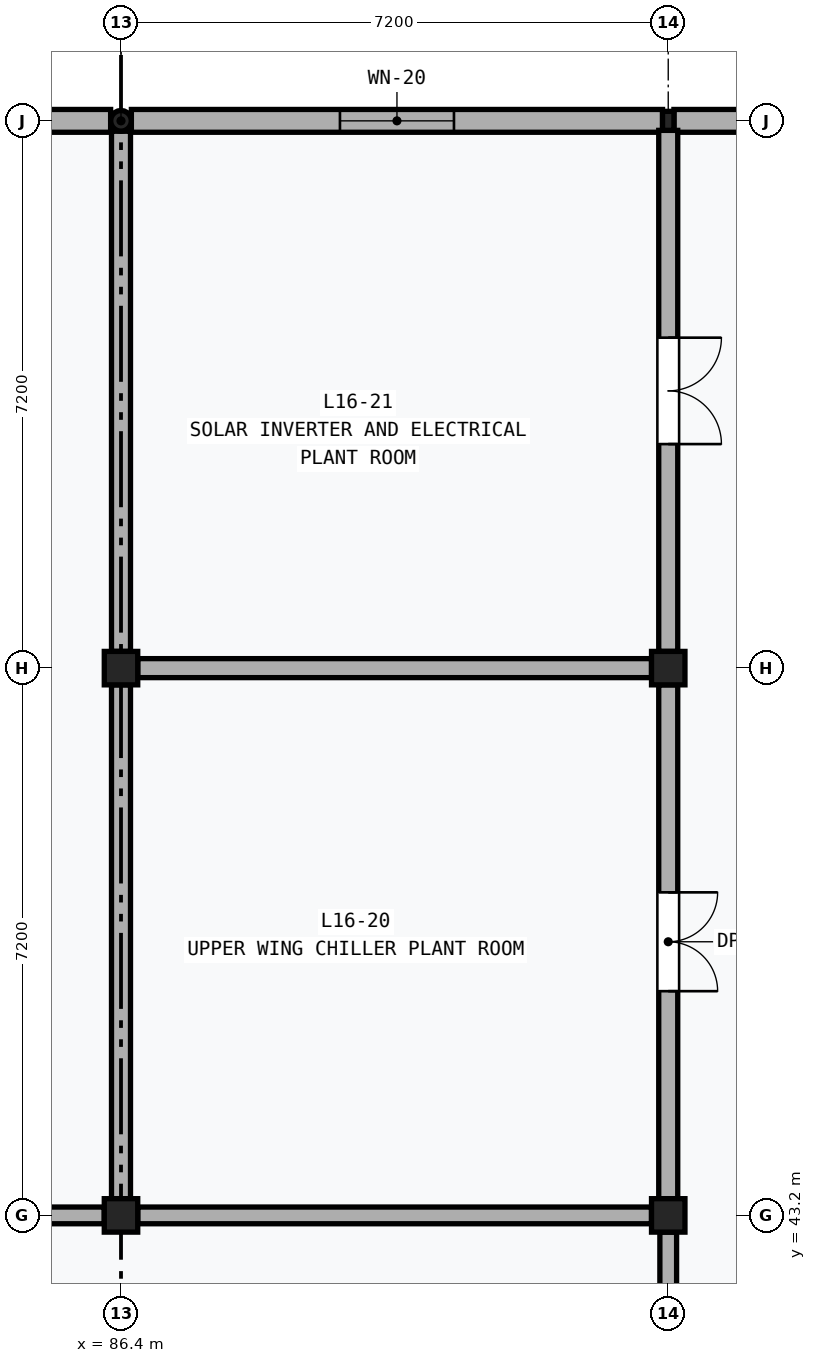
"""IFC4 building model, lengths in metres.
Left out: names, types, materials, properties, quantities, classifications, styles, units other than length and angle.
Written with IfcOpenShell. Run it as: python <this file> out.ifc"""

import sys

from ifc_helpers import new_model, si_unit, direction, frame, frame_2d, origin, origin_2d, place, context, subcontext, project, spatial, rectangle, hollow_rectangle, hollow_circle, extrude, element, fill, save


model = new_model("IFC4")
c1 = context("Model", 3, precision=1e-05, world=origin(), true_north=direction((0.0, 1.0)))
c2 = subcontext(c1, "Body", "Model", "MODEL_VIEW")
j1 = project(units=[si_unit("LENGTHUNIT", "METRE"), si_unit("PLANEANGLEUNIT", "RADIAN")], contexts=[c1])
p1 = place(None, origin())
s1 = spatial("IfcSite", under=j1, at=p1, CompositionType="ELEMENT")
p2 = place(p1, origin())
s2 = spatial("IfcBuilding", under=s1, at=p2, CompositionType="ELEMENT")
p3 = place(p2, frame((0.0, 0.0, 67.2)))
s3 = spatial("IfcBuildingStorey", under=s2, at=p3, CompositionType="ELEMENT", Elevation=67.2)
for number, where, z_axis, x_axis in (
    (1, (86.4, 43.2, 0.0), (0.0, 0.0, 1.0), (1.0, 0.0, 0.0)),
    (2, (86.4, 50.4, 0.0), (0.0, 0.0, 1.0), (1.0, 0.0, 0.0)),
):
    element("IfcColumn", number, at=place(p3, frame(where, z_axis=z_axis, x_axis=x_axis)), inside=s3, PredefinedType="COLUMN", context=c2, shape_type="SweptSolid", body=[
        extrude(rectangle(XDim=0.44, YDim=0.44, at=origin_2d()), origin(), (0.0, 0.0, 1.0), 4.8),
    ])
p4 = place(p3, frame((86.4, 57.6, 0.0), z_axis=(0.0, 0.0, 1.0), x_axis=(1.0, 0.0, 0.0)))
e3 = element("IfcColumn", 3, at=p4, inside=s3, PredefinedType="COLUMN", context=c2, shape_type="SweptSolid", body=[
    extrude(hollow_circle(Radius=0.136, WallThickness=0.012, at=origin_2d()), origin(), (0.0, 0.0, 1.0), 4.8),
])
for number, where, z_axis, x_axis in (
    (4, (93.6, 43.2, 0.0), (0.0, 0.0, 1.0), (1.0, 0.0, 0.0)),
    (5, (93.6, 50.4, 0.0), (0.0, 0.0, 1.0), (1.0, 0.0, 0.0)),
):
    element("IfcColumn", number, at=place(p3, frame(where, z_axis=z_axis, x_axis=x_axis)), inside=s3, PredefinedType="COLUMN", context=c2, shape_type="SweptSolid", body=[
        extrude(rectangle(XDim=0.44, YDim=0.44, at=origin_2d()), origin(), (0.0, 0.0, 1.0), 4.8),
    ])
p5 = place(p3, frame((93.6, 57.6, 0.0), z_axis=(0.0, 0.0, 1.0), x_axis=(1.0, 0.0, 0.0)))
e6 = element("IfcColumn", 6, at=p5, inside=s3, PredefinedType="COLUMN", context=c2, shape_type="SweptSolid", body=[
    extrude(hollow_rectangle(XDim=0.15, YDim=0.25, WallThickness=0.01, at=origin_2d()), origin(), (0.0, 0.0, 1.0), 4.8),
])
p6 = place(p3, frame((79.275, 57.6, 0.0), z_axis=(0.0, 0.0, 1.0), x_axis=(1.0, 0.0, 0.0)))
e7 = element("IfcWall", 7, at=p6, inside=s3, PredefinedType="SOLIDWALL", context=c2, shape_type="SweptSolid", body=[
    extrude(rectangle(XDim=6.989, YDim=0.3, at=frame_2d((3.494, 0.0))), origin(), (0.0, 0.0, 1.0), 4.16),
])
p7 = place(p6, frame((2.244, 0.0, 1.1)))
e8 = element("IfcOpeningElement", 8, at=p7, cuts=e7, PredefinedType="OPENING", context=c2, shape_type="SweptSolid", body=[
    extrude(rectangle(XDim=2.5, YDim=1.5, at=frame_2d((1.25, 0.75))), frame((0.0, 0.162, 0.0), z_axis=(0.0, -1.0, 0.0), x_axis=(1.0, 0.0, 0.0)), (0.0, 0.0, 1.0), 0.324),
])
p8 = place(p3, frame((86.537, 57.6, 0.0), z_axis=(0.0, 0.0, 1.0), x_axis=(1.0, 0.0, 0.0)))
e9 = element("IfcWall", 9, at=p8, inside=s3, PredefinedType="SOLIDWALL", context=c2, shape_type="SweptSolid", body=[
    extrude(rectangle(XDim=6.988, YDim=0.3, at=frame_2d((3.494, 0.0))), origin(), (0.0, 0.0, 1.0), 4.16),
])
p9 = place(p8, frame((2.744, 0.0, 1.2)))
e10 = element("IfcOpeningElement", 10, at=p9, cuts=e9, PredefinedType="OPENING", context=c2, shape_type="SweptSolid", body=[
    extrude(rectangle(XDim=1.5, YDim=1.35, at=frame_2d((0.75, 0.675))), frame((0.0, 0.162, 0.0), z_axis=(0.0, -1.0, 0.0), x_axis=(1.0, 0.0, 0.0)), (0.0, 0.0, 1.0), 0.324),
])
p10 = place(p3, frame((93.675, 57.6, 0.0), z_axis=(0.0, 0.0, 1.0), x_axis=(1.0, 0.0, 0.0)))
e11 = element("IfcWall", 11, at=p10, inside=s3, PredefinedType="SOLIDWALL", context=c2, shape_type="SweptSolid", body=[
    extrude(rectangle(XDim=6.989, YDim=0.3, at=frame_2d((3.494, 0.0))), origin(), (0.0, 0.0, 1.0), 4.16),
])
p11 = place(p10, frame((2.619, 0.0, 1.2)))
e12 = element("IfcOpeningElement", 12, at=p11, cuts=e11, PredefinedType="OPENING", context=c2, shape_type="SweptSolid", body=[
    extrude(rectangle(XDim=1.75, YDim=1.35, at=frame_2d((0.875, 0.675))), frame((0.0, 0.162, 0.0), z_axis=(0.0, -1.0, 0.0), x_axis=(1.0, 0.0, 0.0)), (0.0, 0.0, 1.0), 0.324),
])
p12 = place(p3, frame((79.42, 43.2, 0.0), z_axis=(0.0, 0.0, 1.0), x_axis=(1.0, 0.0, 0.0)))
e13 = element("IfcWall", 13, at=p12, inside=s3, PredefinedType="PARTITIONING", context=c2, shape_type="SweptSolid", body=[
    extrude(rectangle(XDim=6.76, YDim=0.22, at=frame_2d((3.38, 0.0))), origin(), (0.0, 0.0, 1.0), 4.2),
])
p13 = place(p3, frame((86.62, 43.2, 0.0), z_axis=(0.0, 0.0, 1.0), x_axis=(1.0, 0.0, 0.0)))
e14 = element("IfcWall", 14, at=p13, inside=s3, PredefinedType="PARTITIONING", context=c2, shape_type="SweptSolid", body=[
    extrude(rectangle(XDim=6.76, YDim=0.22, at=frame_2d((3.38, 0.0))), origin(), (0.0, 0.0, 1.0), 4.2),
])
p14 = place(p3, frame((93.6, 36.22, 0.0), z_axis=(0.0, 0.0, 1.0), x_axis=(0.0, 1.0, 0.0)))
e15 = element("IfcWall", 15, at=p14, inside=s3, PredefinedType="PARTITIONING", context=c2, shape_type="SweptSolid", body=[
    extrude(rectangle(XDim=6.76, YDim=0.22, at=frame_2d((3.38, 0.0))), origin(), (0.0, 0.0, 1.0), 4.26),
])
p15 = place(p3, frame((86.4, 43.42, 0.0), z_axis=(0.0, 0.0, 1.0), x_axis=(0.0, 1.0, 0.0)))
e16 = element("IfcWall", 16, at=p15, inside=s3, PredefinedType="PARTITIONING", context=c2, shape_type="SweptSolid", body=[
    extrude(rectangle(XDim=6.76, YDim=0.25, at=frame_2d((3.38, 0.0))), origin(), (0.0, 0.0, 1.0), 4.26),
])
p16 = place(p3, frame((86.4, 50.62, 0.0), z_axis=(0.0, 0.0, 1.0), x_axis=(0.0, 1.0, 0.0)))
e17 = element("IfcWall", 17, at=p16, inside=s3, PredefinedType="PARTITIONING", context=c2, shape_type="SweptSolid", body=[
    extrude(rectangle(XDim=6.843, YDim=0.25, at=frame_2d((3.422, 0.0))), origin(), (0.0, 0.0, 1.0), 4.26),
])
p17 = place(p3, frame((86.62, 50.4, 0.0), z_axis=(0.0, 0.0, 1.0), x_axis=(1.0, 0.0, 0.0)))
e18 = element("IfcWall", 18, at=p17, inside=s3, PredefinedType="PARTITIONING", context=c2, shape_type="SweptSolid", body=[
    extrude(rectangle(XDim=6.76, YDim=0.25, at=frame_2d((3.38, 0.0))), origin(), (0.0, 0.0, 1.0), 4.2),
])
p18 = place(p3, frame((93.6, 43.42, 0.0), z_axis=(0.0, 0.0, 1.0), x_axis=(0.0, 1.0, 0.0)))
e19 = element("IfcWall", 19, at=p18, inside=s3, PredefinedType="PARTITIONING", context=c2, shape_type="SweptSolid", body=[
    extrude(rectangle(XDim=6.76, YDim=0.25, at=frame_2d((3.38, 0.0))), origin(), (0.0, 0.0, 1.0), 4.26),
])
p19 = place(p18, frame((2.73, 0.0, 0.0)))
e20 = element("IfcOpeningElement", 20, at=p19, cuts=e19, PredefinedType="OPENING", context=c2, shape_type="SweptSolid", body=[
    extrude(rectangle(XDim=1.3, YDim=2.2, at=frame_2d((0.65, 1.1))), frame((0.0, 0.137, 0.0), z_axis=(0.0, -1.0, 0.0), x_axis=(1.0, 0.0, 0.0)), (0.0, 0.0, 1.0), 0.274),
])
p20 = place(p3, frame((93.6, 50.62, 0.0), z_axis=(0.0, 0.0, 1.0), x_axis=(0.0, 1.0, 0.0)))
e21 = element("IfcWall", 21, at=p20, inside=s3, PredefinedType="PARTITIONING", context=c2, shape_type="SweptSolid", body=[
    extrude(rectangle(XDim=6.855, YDim=0.25, at=frame_2d((3.427, 0.0))), origin(), (0.0, 0.0, 1.0), 4.26),
])
p21 = place(p20, frame((2.728, 0.0, 0.0)))
e22 = element("IfcOpeningElement", 22, at=p21, cuts=e21, PredefinedType="OPENING", context=c2, shape_type="SweptSolid", body=[
    extrude(rectangle(XDim=1.4, YDim=2.25, at=frame_2d((0.7, 1.125))), frame((0.0, 0.137, 0.0), z_axis=(0.0, -1.0, 0.0), x_axis=(1.0, 0.0, 0.0)), (0.0, 0.0, 1.0), 0.274),
])
p22 = place(p9, origin())
e23 = element("IfcWindow", 23, at=p22, inside=s3, PartitioningType="SINGLE_PANEL", PredefinedType="WINDOW", context=c2, shape_type="SweptSolid", body=[
    extrude(rectangle(XDim=1.5, YDim=1.35, at=frame_2d((0.75, 0.675))), frame((0.0, 0.03, 0.0), z_axis=(0.0, -1.0, 0.0), x_axis=(1.0, 0.0, 0.0)), (0.0, 0.0, 1.0), 0.06),
])
fill(e10, e23)
p23 = place(p19, frame((1.3, 0.0, 0.0), z_axis=(0.0, 0.0, 1.0), x_axis=(-1.0, 0.0, 0.0)))
e24 = element("IfcDoor", 24, at=p23, inside=s3, OperationType="DOUBLE_DOOR_SINGLE_SWING", PredefinedType="DOOR", context=c2, shape_type="SweptSolid", body=[
    extrude(rectangle(XDim=1.3, YDim=2.2, at=frame_2d((0.65, 1.1))), frame((0.0, 0.025, 0.0), z_axis=(0.0, -1.0, 0.0), x_axis=(1.0, 0.0, 0.0)), (0.0, 0.0, 1.0), 0.05),
])
fill(e20, e24)
p24 = place(p21, frame((1.4, 0.0, 0.0), z_axis=(0.0, 0.0, 1.0), x_axis=(-1.0, 0.0, 0.0)))
e25 = element("IfcDoor", 25, at=p24, inside=s3, OperationType="DOUBLE_DOOR_SINGLE_SWING", PredefinedType="DOOR", context=c2, shape_type="SweptSolid", body=[
    extrude(rectangle(XDim=1.4, YDim=2.25, at=frame_2d((0.7, 1.125))), frame((0.0, 0.025, 0.0), z_axis=(0.0, -1.0, 0.0), x_axis=(1.0, 0.0, 0.0)), (0.0, 0.0, 1.0), 0.05),
])
fill(e22, e25)
save(model, sys.argv[1])
